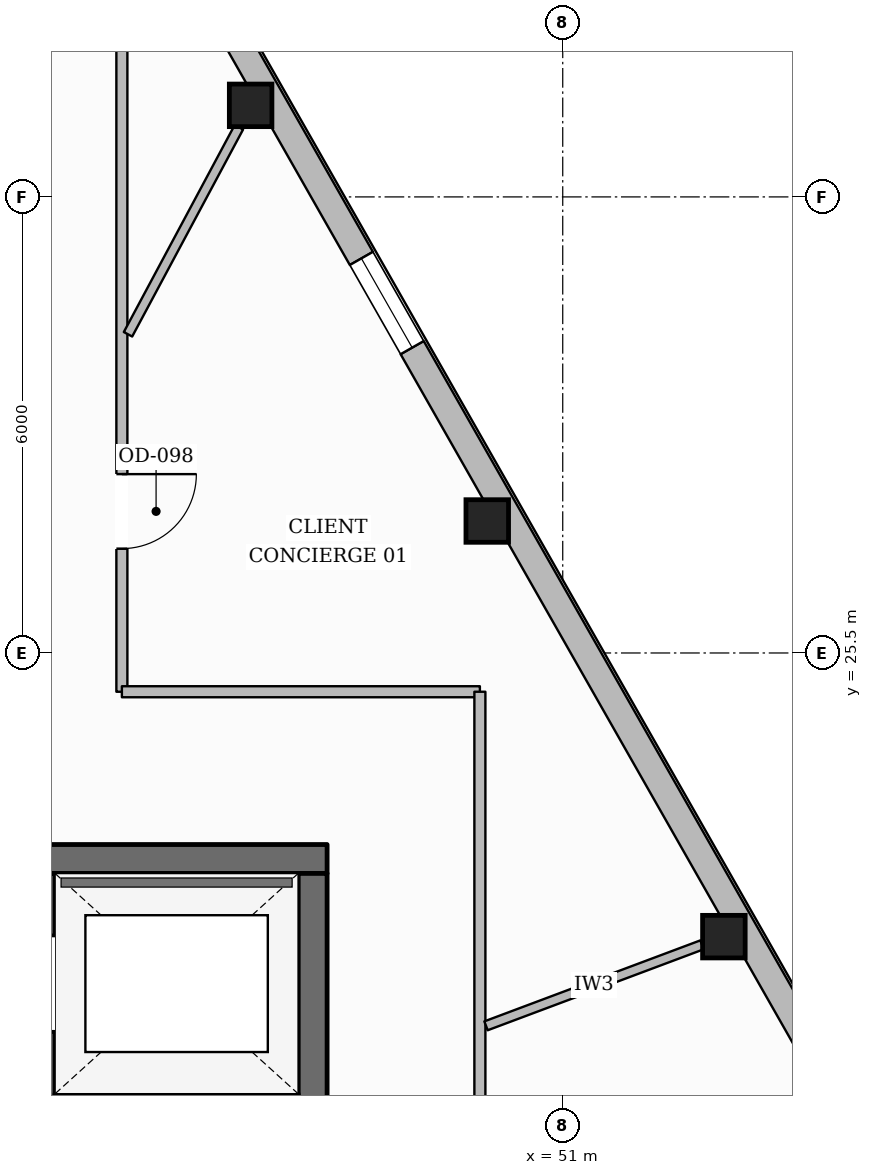
"""IFC4 building model, lengths in metres.
Left out: names, types, materials, properties, quantities, classifications, styles, units other than length and angle.
Written with IfcOpenShell. Run it as: python <this file> out.ifc"""

import sys

from ifc_helpers import new_model, si_unit, direction, frame, frame_2d, origin, origin_2d, place, context, subcontext, project, spatial, rectangle, hollow_rectangle, extrude, element, fill, save


model = new_model("IFC4")
c1 = context("Model", 3, precision=1e-05, world=origin(), true_north=direction((0.0, 1.0)))
c2 = subcontext(c1, "Body", "Model", "MODEL_VIEW")
j1 = project(units=[si_unit("LENGTHUNIT", "METRE"), si_unit("PLANEANGLEUNIT", "RADIAN")], contexts=[c1])
p1 = place(None, origin())
s1 = spatial("IfcSite", under=j1, at=p1, CompositionType="ELEMENT")
p2 = place(p1, origin())
s2 = spatial("IfcBuilding", under=s1, at=p2, CompositionType="ELEMENT")
p3 = place(p2, frame((0.0, 0.0, 289.55)))
s3 = spatial("IfcBuildingStorey", under=s2, at=p3, CompositionType="ELEMENT", Elevation=289.55)
p4 = place(p3, frame((28.1, 22.79, 0.0), z_axis=(0.0, 0.0, 1.0), x_axis=(1.0, 0.0, 0.0)))
e1 = element("IfcWall", 1, at=p4, inside=s3, PredefinedType="SOLIDWALL", context=c2, shape_type="SweptSolid", body=[
    extrude(rectangle(XDim=19.8, YDim=0.38, at=frame_2d((9.9, 0.0))), origin(), (0.0, 0.0, 1.0), 3.61),
])
p5 = place(p4, frame((6.175, 0.0, 0.0)))
e2 = element("IfcOpeningElement", 2, at=p5, cuts=e1, PredefinedType="OPENING", context=c2, shape_type="SweptSolid", body=[
    extrude(rectangle(XDim=1.05, YDim=2.15, at=frame_2d((0.525, 1.075))), frame((0.0, 0.2, 0.0), z_axis=(0.0, -1.0, 0.0), x_axis=(1.0, 0.0, 0.0)), (0.0, 0.0, 1.0), 0.4),
])
p6 = place(p4, frame((12.575, 0.0, 0.0)))
e3 = element("IfcOpeningElement", 3, at=p6, cuts=e1, PredefinedType="OPENING", context=c2, shape_type="SweptSolid", body=[
    extrude(rectangle(XDim=1.05, YDim=2.15, at=frame_2d((0.525, 1.075))), frame((0.0, 0.2, 0.0), z_axis=(0.0, -1.0, 0.0), x_axis=(1.0, 0.0, 0.0)), (0.0, 0.0, 1.0), 0.4),
])
p7 = place(p3, frame((47.71, 9.6, 0.0), z_axis=(0.0, 0.0, 1.0), x_axis=(0.0, 1.0, 0.0)))
e4 = element("IfcWall", 4, at=p7, inside=s3, PredefinedType="SOLIDWALL", context=c2, shape_type="SweptSolid", body=[
    extrude(rectangle(XDim=13.0, YDim=0.38, at=frame_2d((6.5, 0.0))), origin(), (0.0, 0.0, 1.0), 3.61),
])
p8 = place(p7, frame((0.2, 0.0, 0.0)))
e5 = element("IfcOpeningElement", 5, at=p8, cuts=e4, PredefinedType="OPENING", context=c2, shape_type="SweptSolid", body=[
    extrude(rectangle(XDim=1.1, YDim=2.15, at=frame_2d((0.55, 1.075))), frame((0.0, 0.2, 0.0), z_axis=(0.0, -1.0, 0.0), x_axis=(1.0, 0.0, 0.0)), (0.0, 0.0, 1.0), 0.4),
])
p9 = place(p7, frame((8.4, 0.0, 0.0)))
e6 = element("IfcOpeningElement", 6, at=p9, cuts=e4, PredefinedType="OPENING", context=c2, shape_type="SweptSolid", body=[
    extrude(rectangle(XDim=0.9, YDim=2.1, at=frame_2d((0.45, 1.05))), frame((0.0, 0.2, 0.0), z_axis=(0.0, -1.0, 0.0), x_axis=(1.0, 0.0, 0.0)), (0.0, 0.0, 1.0), 0.4),
])
p10 = place(p3, frame((44.19, 9.6, 0.0), z_axis=(0.0, 0.0, 1.0), x_axis=(0.0, 1.0, 0.0)))
e7 = element("IfcWall", 7, at=p10, inside=s3, PredefinedType="SHEAR", context=c2, shape_type="SweptSolid", body=[
    extrude(rectangle(XDim=13.0, YDim=0.26, at=frame_2d((6.5, 0.0))), origin(), (0.0, 0.0, 1.0), 3.61),
])
p11 = place(p10, frame((10.925, 0.0, 0.0)))
e8 = element("IfcOpeningElement", 8, at=p11, cuts=e7, PredefinedType="OPENING", context=c2, shape_type="SweptSolid", body=[
    extrude(rectangle(XDim=1.25, YDim=2.25, at=frame_2d((0.625, 1.125))), frame((0.0, 0.14, 0.0), z_axis=(0.0, -1.0, 0.0), x_axis=(1.0, 0.0, 0.0)), (0.0, 0.0, 1.0), 0.28),
])
p12 = place(p3, frame((44.32, 19.57, 0.0), z_axis=(0.0, 0.0, 1.0), x_axis=(1.0, 0.0, 0.0)))
e9 = element("IfcWall", 9, at=p12, inside=s3, PredefinedType="SHEAR", context=c2, shape_type="SweptSolid", body=[
    extrude(rectangle(XDim=3.2, YDim=0.26, at=frame_2d((1.6, 0.0))), origin(), (0.0, 0.0, 1.0), 3.61),
])
for number, where, z_axis, x_axis in (
    (10, (53.12, 21.768, 0.0), (0.0, 0.0, 1.0), (1.0, 0.0, 0.0)),
    (11, (50.007, 27.236, 0.0), (0.0, 0.0, 1.0), (1.0, 0.0, 0.0)),
    (12, (46.894, 32.705, 0.0), (0.0, 0.0, 1.0), (1.0, 0.0, 0.0)),
):
    element("IfcColumn", number, at=place(p3, frame(where, z_axis=z_axis, x_axis=x_axis)), inside=s3, PredefinedType="COLUMN", context=c2, shape_type="SweptSolid", body=[
        extrude(hollow_rectangle(XDim=0.56, YDim=0.56, WallThickness=0.025, at=origin_2d()), origin(), (0.0, 0.0, 1.0), 3.61),
    ])
p13 = place(p3, frame((40.664, 44.194, 0.0), z_axis=(0.0, 0.0, 1.0), x_axis=(0.494747407388, -0.869036824814, 0.0)))
e13 = element("IfcWall", 13, at=p13, inside=s3, PredefinedType="STANDARD", context=c2, shape_type="SweptSolid", body=[
    extrude(rectangle(XDim=38.713, YDim=0.35, at=frame_2d((19.357, 0.0))), origin(), (0.0, 0.0, 1.0), 3.196),
])
p14 = place(p13, frame((34.415, 0.0, 0.65)))
e14 = element("IfcOpeningElement", 14, at=p14, cuts=e13, PredefinedType="OPENING", context=c2, shape_type="SweptSolid", body=[
    extrude(rectangle(XDim=1.35, YDim=1.75, at=frame_2d((0.675, 0.875))), frame((0.0, 0.185, 0.0), z_axis=(0.0, -1.0, 0.0), x_axis=(1.0, 0.0, 0.0)), (0.0, 0.0, 1.0), 0.37),
])
p15 = place(p13, frame((28.123, 0.0, 0.65)))
e15 = element("IfcOpeningElement", 15, at=p15, cuts=e13, PredefinedType="OPENING", context=c2, shape_type="SweptSolid", body=[
    extrude(rectangle(XDim=1.35, YDim=1.75, at=frame_2d((0.675, 0.875))), frame((0.0, 0.185, 0.0), z_axis=(0.0, -1.0, 0.0), x_axis=(1.0, 0.0, 0.0)), (0.0, 0.0, 1.0), 0.37),
])
p16 = place(p13, frame((15.539, 0.0, 0.65)))
e16 = element("IfcOpeningElement", 16, at=p16, cuts=e13, PredefinedType="OPENING", context=c2, shape_type="SweptSolid", body=[
    extrude(rectangle(XDim=1.35, YDim=1.75, at=frame_2d((0.675, 0.875))), frame((0.0, 0.185, 0.0), z_axis=(0.0, -1.0, 0.0), x_axis=(1.0, 0.0, 0.0)), (0.0, 0.0, 1.0), 0.37),
])
p17 = place(p13, frame((9.246, 0.0, 0.65)))
e17 = element("IfcOpeningElement", 17, at=p17, cuts=e13, PredefinedType="OPENING", context=c2, shape_type="SweptSolid", body=[
    extrude(rectangle(XDim=1.35, YDim=1.75, at=frame_2d((0.675, 0.875))), frame((0.0, 0.185, 0.0), z_axis=(0.0, -1.0, 0.0), x_axis=(1.0, 0.0, 0.0)), (0.0, 0.0, 1.0), 0.37),
])
p18 = place(p13, frame((2.954, 0.0, 0.65)))
e18 = element("IfcOpeningElement", 18, at=p18, cuts=e13, PredefinedType="OPENING", context=c2, shape_type="SweptSolid", body=[
    extrude(rectangle(XDim=1.35, YDim=1.75, at=frame_2d((0.675, 0.875))), frame((0.0, 0.185, 0.0), z_axis=(0.0, -1.0, 0.0), x_axis=(1.0, 0.0, 0.0)), (0.0, 0.0, 1.0), 0.37),
])
p19 = place(p3, frame((45.2, 33.554, 0.0), z_axis=(0.0, 0.0, 1.0), x_axis=(0.0, -1.0, 0.0)))
e19 = element("IfcWall", 19, at=p19, inside=s3, PredefinedType="PARTITIONING", context=c2, shape_type="SweptSolid", body=[
    extrude(rectangle(XDim=8.564, YDim=0.145, at=frame_2d((4.282, 0.0))), origin(), (0.0, 0.0, 1.0), 3.61),
])
p20 = place(p19, frame((5.701, 0.0, 0.0)))
e20 = element("IfcOpeningElement", 20, at=p20, cuts=e19, PredefinedType="OPENING", context=c2, shape_type="SweptSolid", body=[
    extrude(rectangle(XDim=0.98, YDim=2.15, at=frame_2d((0.49, 1.075))), frame((0.0, 0.083, 0.0), z_axis=(0.0, -1.0, 0.0), x_axis=(1.0, 0.0, 0.0)), (0.0, 0.0, 1.0), 0.165),
])
p21 = place(p3, frame((45.2, 24.99, 0.0), z_axis=(0.0, 0.0, 1.0), x_axis=(1.0, 0.0, 0.0)))
e21 = element("IfcWall", 21, at=p21, inside=s3, PredefinedType="PARTITIONING", context=c2, shape_type="SweptSolid", body=[
    extrude(rectangle(XDim=4.71, YDim=0.145, at=frame_2d((2.355, 0.0))), origin(), (0.0, 0.0, 1.0), 3.61),
])
p22 = place(p3, frame((49.91, 24.99, 0.0), z_axis=(0.0, 0.0, 1.0), x_axis=(0.0, -1.0, 0.0)))
e22 = element("IfcWall", 22, at=p22, inside=s3, PredefinedType="PARTITIONING", context=c2, shape_type="SweptSolid", body=[
    extrude(rectangle(XDim=7.34, YDim=0.145, at=frame_2d((3.67, 0.0))), origin(), (0.0, 0.0, 1.0), 3.349),
])
p23 = place(p3, frame((49.99, 20.595, 0.0), z_axis=(0.0, 0.0, 1.0), x_axis=(0.936372151361, 0.351008823472, 0.0)))
e23 = element("IfcWall", 23, at=p23, inside=s3, PredefinedType="PARTITIONING", context=c2, shape_type="SweptSolid", body=[
    extrude(rectangle(XDim=3.035, YDim=0.125, at=frame_2d((1.517, 0.0))), origin(), (0.0, 0.0, 1.0), 3.61),
])
p24 = place(p3, frame((45.281, 29.693, 0.0), z_axis=(0.0, 0.0, 1.0), x_axis=(0.472162212873, 0.881511681564, 0.0)))
e24 = element("IfcWall", 24, at=p24, inside=s3, PredefinedType="PARTITIONING", context=c2, shape_type="SweptSolid", body=[
    extrude(rectangle(XDim=3.09, YDim=0.125, at=frame_2d((1.545, 0.0))), origin(), (0.0, 0.0, 1.0), 3.61),
])
p25 = place(p16, origin())
e25 = element("IfcWindow", 25, at=p25, inside=s3, PartitioningType="SINGLE_PANEL", PredefinedType="WINDOW", context=c2, shape_type="SweptSolid", body=[
    extrude(rectangle(XDim=1.35, YDim=1.75, at=frame_2d((0.675, 0.875))), frame((0.0, 0.03, 0.0), z_axis=(0.0, -1.0, 0.0), x_axis=(1.0, 0.0, 0.0)), (0.0, 0.0, 1.0), 0.06),
])
fill(e16, e25)
p26 = place(p20, origin())
e26 = element("IfcDoor", 26, at=p26, inside=s3, OperationType="SINGLE_SWING_LEFT", PredefinedType="DOOR", context=c2, shape_type="SweptSolid", body=[
    extrude(rectangle(XDim=0.98, YDim=2.15, at=frame_2d((0.49, 1.075))), frame((0.0, 0.025, 0.0), z_axis=(0.0, -1.0, 0.0), x_axis=(1.0, 0.0, 0.0)), (0.0, 0.0, 1.0), 0.05),
])
fill(e20, e26)
save(model, sys.argv[1])
